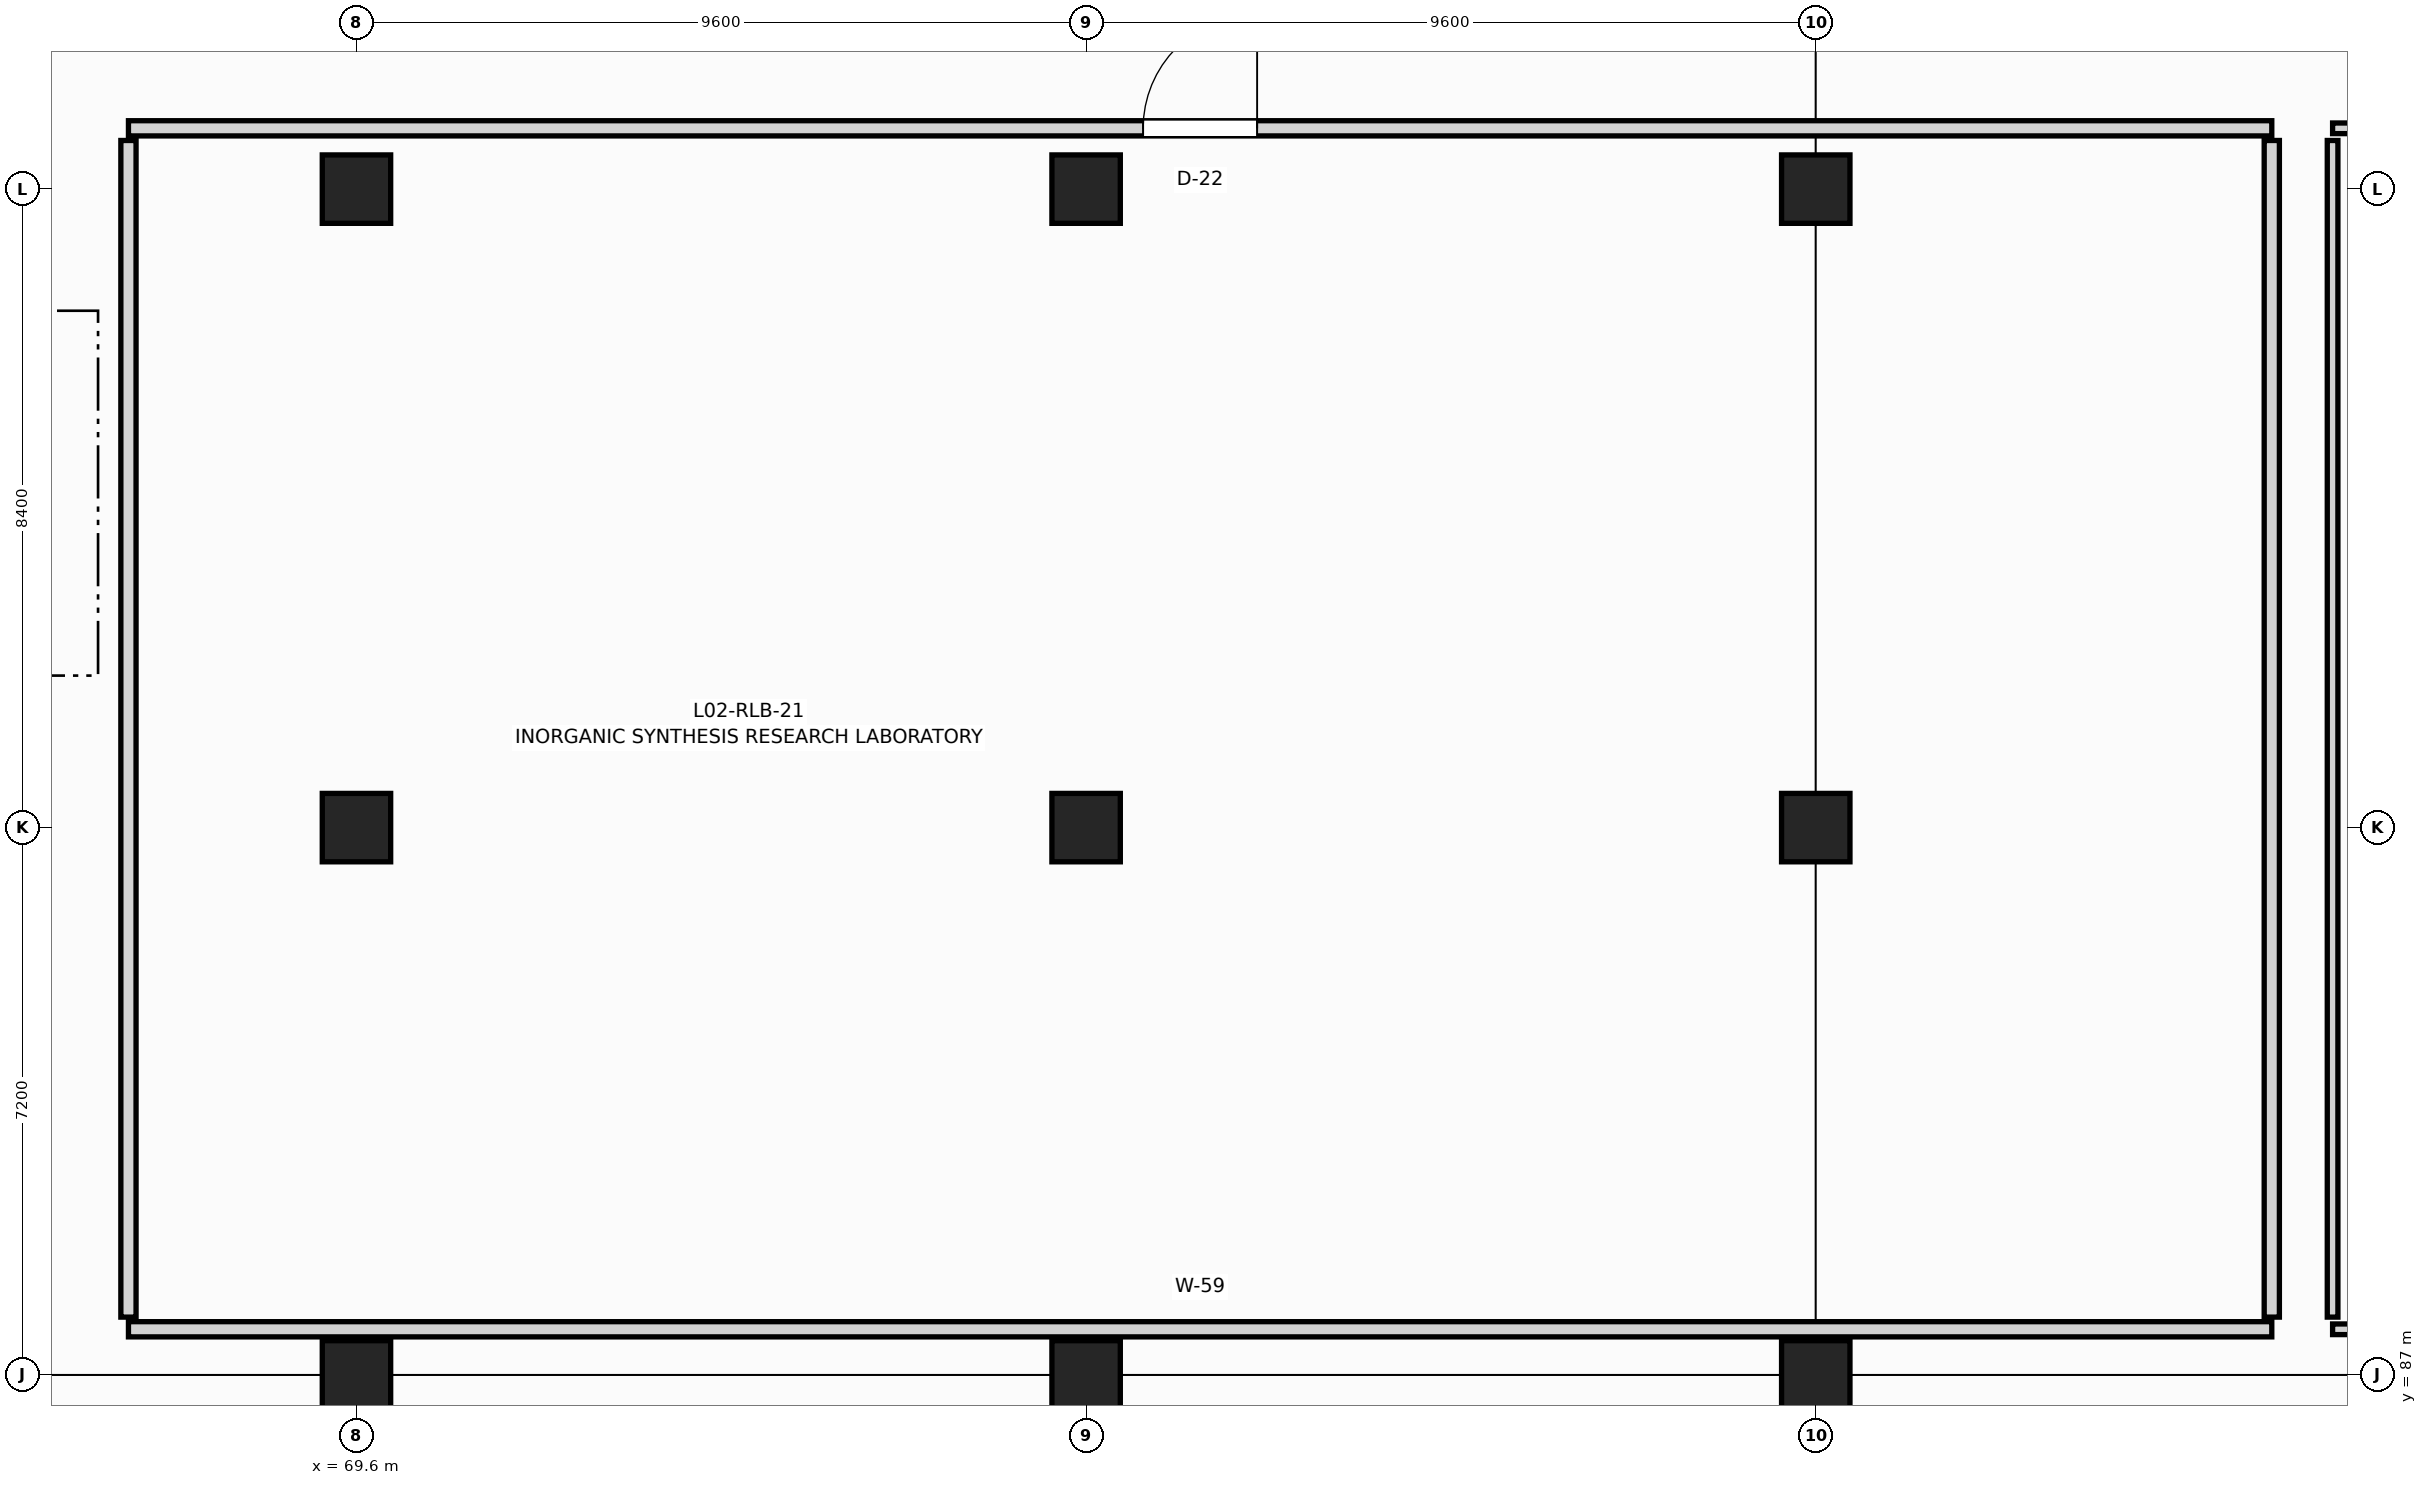
"""IFC4 building model, lengths in metres.
Left out: names, types, materials, properties, quantities, classifications, styles, units other than length and angle.
Written with IfcOpenShell. Run it as: python <this file> out.ifc"""

import sys

from ifc_helpers import new_model, si_unit, direction, frame, frame_2d, origin, origin_2d, place, context, subcontext, project, spatial, rectangle, extrude, element, fill, save


model = new_model("IFC4")
c1 = context("Model", 3, precision=1e-05, world=origin(), true_north=direction((0.0, 1.0)))
c2 = subcontext(c1, "Body", "Model", "MODEL_VIEW")
j1 = project(units=[si_unit("LENGTHUNIT", "METRE"), si_unit("PLANEANGLEUNIT", "RADIAN")], contexts=[c1])
p1 = place(None, origin())
s1 = spatial("IfcSite", under=j1, at=p1, CompositionType="ELEMENT")
p2 = place(p1, origin())
s2 = spatial("IfcBuilding", under=s1, at=p2, CompositionType="ELEMENT")
p3 = place(p2, frame((0.0, 0.0, 9.9)))
s3 = spatial("IfcBuildingStorey", under=s2, at=p3, CompositionType="ELEMENT", Elevation=9.9)
for number, where, z_axis, x_axis in (
    (1, (69.6, 87.0, 0.0), (0.0, 0.0, 1.0), (1.0, 0.0, 0.0)),
    (2, (69.6, 94.2, 0.0), (0.0, 0.0, 1.0), (1.0, 0.0, 0.0)),
    (3, (69.6, 102.6, 0.0), (0.0, 0.0, 1.0), (1.0, 0.0, 0.0)),
    (4, (79.2, 87.0, 0.0), (0.0, 0.0, 1.0), (1.0, 0.0, 0.0)),
    (5, (79.2, 94.2, 0.0), (0.0, 0.0, 1.0), (1.0, 0.0, 0.0)),
    (6, (79.2, 102.6, 0.0), (0.0, 0.0, 1.0), (1.0, 0.0, 0.0)),
    (7, (88.8, 87.0, 0.0), (0.0, 0.0, 1.0), (1.0, 0.0, 0.0)),
    (8, (88.8, 94.2, 0.0), (0.0, 0.0, 1.0), (1.0, 0.0, 0.0)),
    (9, (88.8, 102.6, 0.0), (0.0, 0.0, 1.0), (1.0, 0.0, 0.0)),
):
    element("IfcColumn", number, at=place(p3, frame(where, z_axis=z_axis, x_axis=x_axis)), inside=s3, PredefinedType="COLUMN", context=c2, shape_type="SweptSolid", body=[
        extrude(rectangle(XDim=0.9, YDim=0.9, at=origin_2d()), origin(), (0.0, 0.0, 1.0), 3.9),
    ])
p4 = place(p3, frame((66.6, 87.6, 0.0), z_axis=(0.0, 0.0, 1.0), x_axis=(1.0, 0.0, 0.0)))
e10 = element("IfcWall", 10, at=p4, inside=s3, PredefinedType="PARTITIONING", context=c2, shape_type="SweptSolid", body=[
    extrude(rectangle(XDim=28.2, YDim=0.2, at=frame_2d((14.1, 0.0))), origin(), (0.0, 0.0, 1.0), 2.92),
])
p5 = place(p3, frame((66.6, 103.4, 0.0), z_axis=(0.0, 0.0, 1.0), x_axis=(1.0, 0.0, 0.0)))
e11 = element("IfcWall", 11, at=p5, inside=s3, PredefinedType="PARTITIONING", context=c2, shape_type="SweptSolid", body=[
    extrude(rectangle(XDim=28.2, YDim=0.2, at=frame_2d((14.1, 0.0))), origin(), (0.0, 0.0, 1.0), 2.92),
])
p6 = place(p5, frame((13.35, 0.0, 0.0)))
e12 = element("IfcOpeningElement", 12, at=p6, cuts=e11, PredefinedType="OPENING", context=c2, shape_type="SweptSolid", body=[
    extrude(rectangle(XDim=1.5, YDim=2.2, at=frame_2d((0.75, 1.1))), frame((0.0, 0.11, 0.0), z_axis=(0.0, -1.0, 0.0), x_axis=(1.0, 0.0, 0.0)), (0.0, 0.0, 1.0), 0.22),
])
for number, where, z_axis, x_axis in (
    (13, (66.6, 87.76, 0.0), (0.0, 0.0, 1.0), (0.0, 1.0, 0.0)),
    (14, (94.8, 87.76, 0.0), (0.0, 0.0, 1.0), (0.0, 1.0, 0.0)),
):
    element("IfcWall", number, at=place(p3, frame(where, z_axis=z_axis, x_axis=x_axis)), inside=s3, PredefinedType="PARTITIONING", context=c2, shape_type="SweptSolid", body=[
        extrude(rectangle(XDim=15.48, YDim=0.2, at=frame_2d((7.74, 0.0))), origin(), (0.0, 0.0, 1.0), 2.92),
    ])
p7 = place(p3, frame((95.6, 87.6, 0.0), z_axis=(0.0, 0.0, 1.0), x_axis=(1.0, 0.0, 0.0)))
e15 = element("IfcWall", 15, at=p7, inside=s3, PredefinedType="PARTITIONING", context=c2, shape_type="SweptSolid", body=[
    extrude(rectangle(XDim=21.2, YDim=0.14, at=frame_2d((10.6, 0.0))), origin(), (0.0, 0.0, 1.0), 2.92),
])
p8 = place(p3, frame((95.6, 103.4, 0.0), z_axis=(0.0, 0.0, 1.0), x_axis=(1.0, 0.0, 0.0)))
e16 = element("IfcWall", 16, at=p8, inside=s3, PredefinedType="PARTITIONING", context=c2, shape_type="SweptSolid", body=[
    extrude(rectangle(XDim=21.2, YDim=0.14, at=frame_2d((10.6, 0.0))), origin(), (0.0, 0.0, 1.0), 2.92),
])
p9 = place(p8, frame((10.09, 0.0, 0.0)))
e17 = element("IfcOpeningElement", 17, at=p9, cuts=e16, PredefinedType="OPENING", context=c2, shape_type="SweptSolid", body=[
    extrude(rectangle(XDim=1.02, YDim=2.2, at=frame_2d((0.51, 1.1))), frame((0.0, 0.08, 0.0), z_axis=(0.0, -1.0, 0.0), x_axis=(1.0, 0.0, 0.0)), (0.0, 0.0, 1.0), 0.16),
])
p10 = place(p3, frame((95.6, 87.76, 0.0), z_axis=(0.0, 0.0, 1.0), x_axis=(0.0, 1.0, 0.0)))
e18 = element("IfcWall", 18, at=p10, inside=s3, PredefinedType="PARTITIONING", context=c2, shape_type="SweptSolid", body=[
    extrude(rectangle(XDim=15.48, YDim=0.14, at=frame_2d((7.74, 0.0))), origin(), (0.0, 0.0, 1.0), 2.92),
])
p11 = place(p6, origin())
e19 = element("IfcDoor", 19, at=p11, inside=s3, OperationType="SINGLE_SWING_RIGHT", PredefinedType="DOOR", context=c2, shape_type="SweptSolid", body=[
    extrude(rectangle(XDim=1.5, YDim=2.2, at=frame_2d((0.75, 1.1))), frame((0.0, 0.025, 0.0), z_axis=(0.0, -1.0, 0.0), x_axis=(1.0, 0.0, 0.0)), (0.0, 0.0, 1.0), 0.05),
])
fill(e12, e19)
save(model, sys.argv[1])
